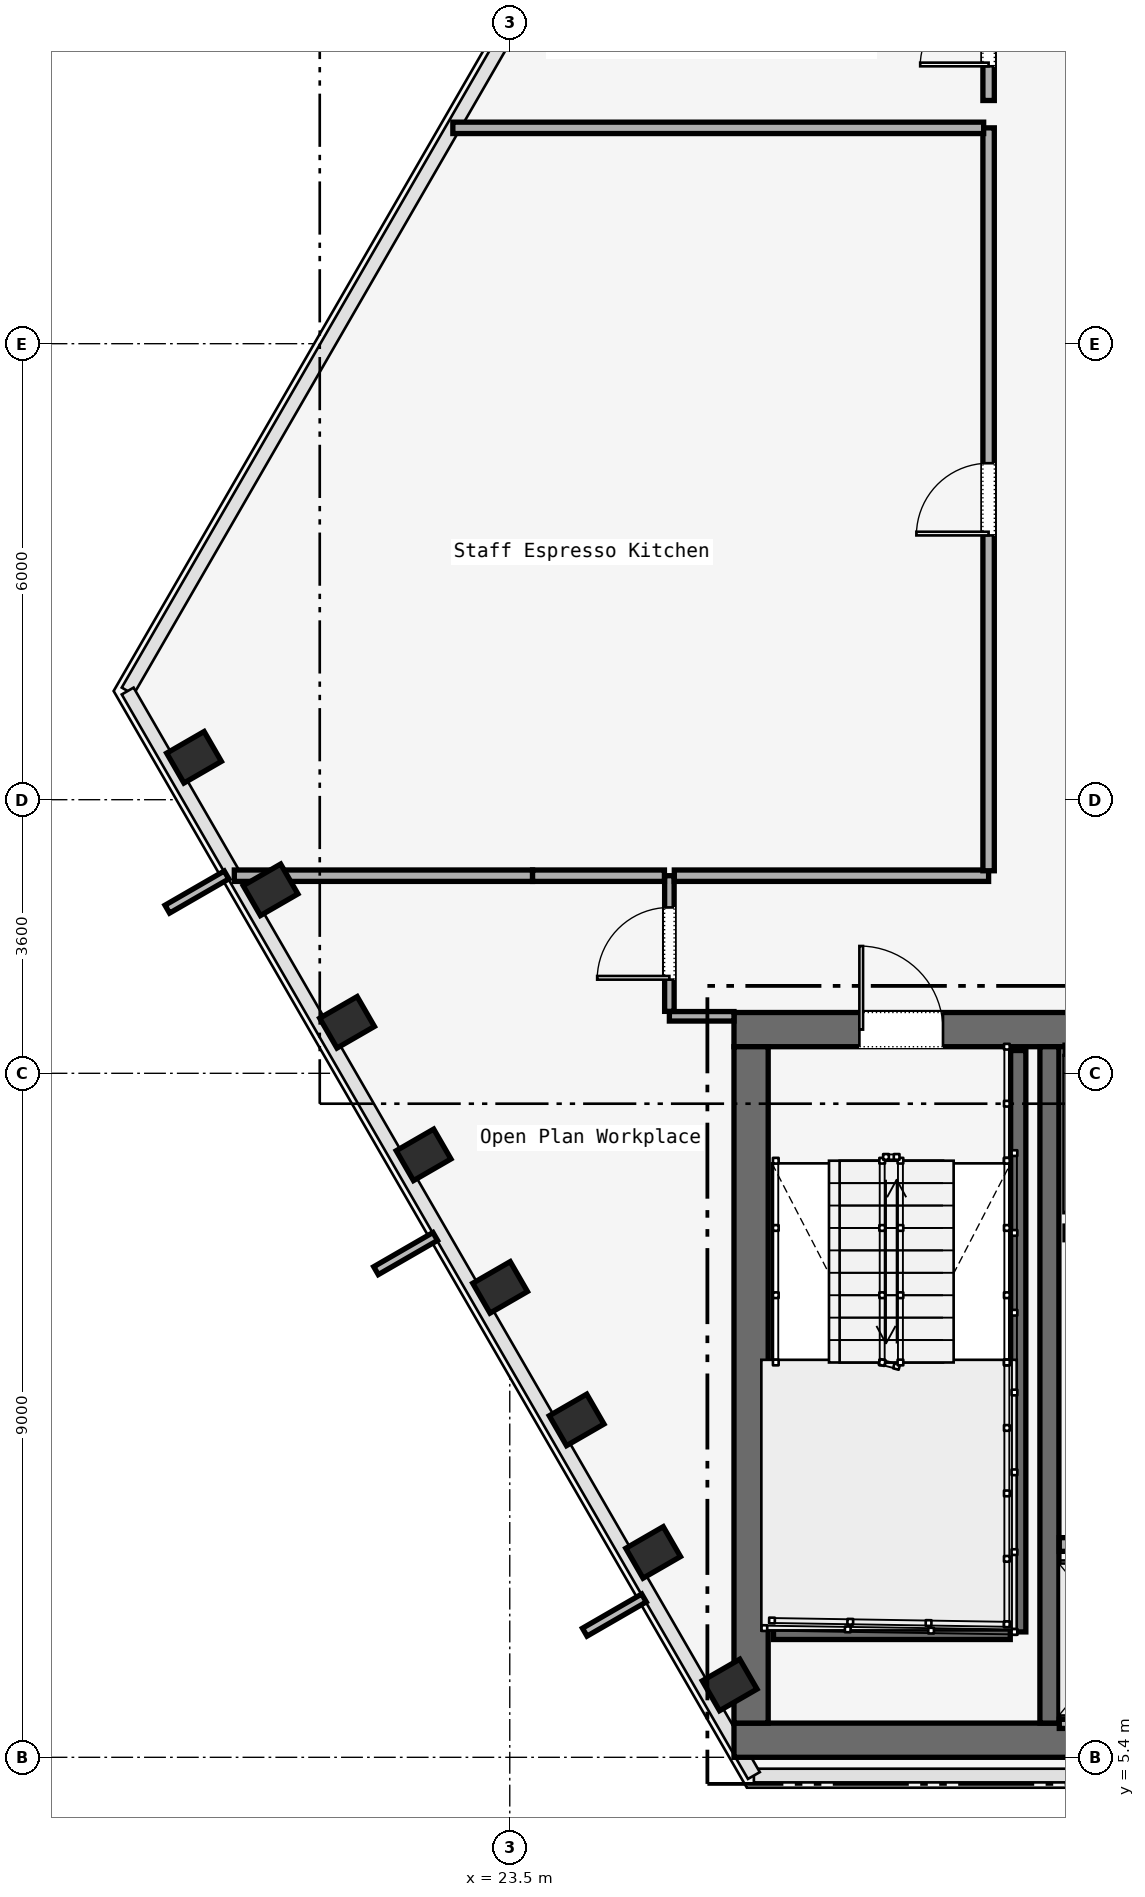
"""IFC4 building model, lengths in metres.
Left out: names, types, materials, properties, quantities, classifications, styles, units other than length and angle.
Written with IfcOpenShell. Run it as: python <this file> out.ifc"""

import sys

from ifc_helpers import new_model, si_unit, direction, frame, frame_2d, origin, origin_2d, place, context, subcontext, project, spatial, rectangle, i_section, extrude, element, fill, save


model = new_model("IFC4")
c1 = context("Model", 3, precision=1e-05, world=origin(), true_north=direction((0.0, 1.0)))
c2 = subcontext(c1, "Body", "Model", "MODEL_VIEW")
j1 = project(units=[si_unit("LENGTHUNIT", "METRE"), si_unit("PLANEANGLEUNIT", "RADIAN")], contexts=[c1])
p1 = place(None, origin())
s1 = spatial("IfcSite", under=j1, at=p1, CompositionType="ELEMENT")
p2 = place(p1, origin())
s2 = spatial("IfcBuilding", under=s1, at=p2, CompositionType="ELEMENT")
p3 = place(p2, frame((0.0, 0.0, 36.0)))
s3 = spatial("IfcBuildingStorey", under=s2, at=p3, CompositionType="ELEMENT", Elevation=36.0)
p4 = place(p3, frame((26.45, 14.975, 0.0), z_axis=(0.0, 0.0, 1.0), x_axis=(1.0, 0.0, 0.0)))
e1 = element("IfcWall", 1, at=p4, inside=s3, PredefinedType="SOLIDWALL", context=c2, shape_type="SweptSolid", body=[
    extrude(rectangle(XDim=31.1, YDim=0.45, at=frame_2d((15.55, 0.0))), origin(), (0.0, 0.0, 1.0), 3.58),
])
p5 = place(p4, frame((1.65, 0.0, 0.0)))
e2 = element("IfcOpeningElement", 2, at=p5, cuts=e1, PredefinedType="OPENING", context=c2, shape_type="SweptSolid", body=[
    extrude(rectangle(XDim=1.1, YDim=2.2, at=frame_2d((0.55, 1.1))), frame((0.0, 0.225, 0.0), z_axis=(0.0, -1.0, 0.0), x_axis=(1.0, 0.0, 0.0)), (0.0, 0.0, 1.0), 0.45),
])
p6 = place(p4, frame((13.65, 0.0, 0.0)))
e3 = element("IfcOpeningElement", 3, at=p6, cuts=e1, PredefinedType="OPENING", context=c2, shape_type="SweptSolid", body=[
    extrude(rectangle(XDim=1.1, YDim=2.2, at=frame_2d((0.55, 1.1))), frame((0.0, 0.225, 0.0), z_axis=(0.0, -1.0, 0.0), x_axis=(1.0, 0.0, 0.0)), (0.0, 0.0, 1.0), 0.45),
])
p7 = place(p4, frame((25.55, 0.0, 0.0)))
e4 = element("IfcOpeningElement", 4, at=p7, cuts=e1, PredefinedType="OPENING", context=c2, shape_type="SweptSolid", body=[
    extrude(rectangle(XDim=1.1, YDim=2.2, at=frame_2d((0.55, 1.1))), frame((0.0, 0.225, 0.0), z_axis=(0.0, -1.0, 0.0), x_axis=(1.0, 0.0, 0.0)), (0.0, 0.0, 1.0), 0.45),
])
p8 = place(p4, frame((10.7, 0.0, 0.0)))
e5 = element("IfcOpeningElement", 5, at=p8, cuts=e1, PredefinedType="OPENING", context=c2, shape_type="SweptSolid", body=[
    extrude(rectangle(XDim=1.4, YDim=2.2, at=frame_2d((0.7, 1.1))), frame((0.0, 0.225, 0.0), z_axis=(0.0, -1.0, 0.0), x_axis=(1.0, 0.0, 0.0)), (0.0, 0.0, 1.0), 0.45),
])
p9 = place(p4, frame((19.35, 0.0, 0.0)))
e6 = element("IfcOpeningElement", 6, at=p9, cuts=e1, PredefinedType="OPENING", context=c2, shape_type="SweptSolid", body=[
    extrude(rectangle(XDim=1.1, YDim=2.2, at=frame_2d((0.55, 1.1))), frame((0.0, 0.225, 0.0), z_axis=(0.0, -1.0, 0.0), x_axis=(1.0, 0.0, 0.0)), (0.0, 0.0, 1.0), 0.45),
])
p10 = place(p4, frame((21.4, 0.0, 0.0)))
e7 = element("IfcOpeningElement", 7, at=p10, cuts=e1, PredefinedType="OPENING", context=c2, shape_type="SweptSolid", body=[
    extrude(rectangle(XDim=0.9, YDim=2.1, at=frame_2d((0.45, 1.05))), frame((0.0, 0.225, 0.0), z_axis=(0.0, -1.0, 0.0), x_axis=(1.0, 0.0, 0.0)), (0.0, 0.0, 1.0), 0.45),
])
p11 = place(p4, frame((23.35, 0.0, 0.0)))
e8 = element("IfcOpeningElement", 8, at=p11, cuts=e1, PredefinedType="OPENING", context=c2, shape_type="SweptSolid", body=[
    extrude(rectangle(XDim=1.3, YDim=2.3, at=frame_2d((0.65, 1.15))), frame((0.0, 0.225, 0.0), z_axis=(0.0, -1.0, 0.0), x_axis=(1.0, 0.0, 0.0)), (0.0, 0.0, 1.0), 0.45),
])
p12 = place(p3, frame((26.45, 5.625, 0.0), z_axis=(0.0, 0.0, 1.0), x_axis=(1.0, 0.0, 0.0)))
e9 = element("IfcWall", 9, at=p12, inside=s3, PredefinedType="SOLIDWALL", context=c2, shape_type="SweptSolid", body=[
    extrude(rectangle(XDim=31.1, YDim=0.45, at=frame_2d((15.55, 0.0))), origin(), (0.0, 0.0, 1.0), 3.58),
])
p13 = place(p3, frame((26.675, 5.85, 0.0), z_axis=(0.0, 0.0, 1.0), x_axis=(0.0, 1.0, 0.0)))
e10 = element("IfcWall", 10, at=p13, inside=s3, PredefinedType="SOLIDWALL", context=c2, shape_type="SweptSolid", body=[
    extrude(rectangle(XDim=8.9, YDim=0.45, at=frame_2d((4.45, 0.0))), origin(), (0.0, 0.0, 1.0), 3.58),
])
p14 = place(p3, frame((30.6, 5.85, 0.0), z_axis=(0.0, 0.0, 1.0), x_axis=(0.0, 1.0, 0.0)))
e11 = element("IfcWall", 11, at=p14, inside=s3, PredefinedType="SOLIDWALL", context=c2, shape_type="SweptSolid", body=[
    extrude(rectangle(XDim=8.9, YDim=0.25, at=frame_2d((4.45, 0.0))), origin(), (0.0, 0.0, 1.0), 3.58),
])
for number, where, z_axis, x_axis in (
    (12, (19.346, 18.558, 0.0), (0.0, 0.0, 1.0), (-0.5, 0.866, 0.0)),
    (13, (20.353, 16.814, 0.0), (0.0, 0.0, 1.0), (-0.5, 0.866, 0.0)),
    (14, (21.359, 15.071, 0.0), (0.0, 0.0, 1.0), (-0.5, 0.866, 0.0)),
    (15, (22.366, 13.327, 0.0), (0.0, 0.0, 1.0), (-0.5, 0.866, 0.0)),
    (16, (23.373, 11.583, 0.0), (0.0, 0.0, 1.0), (-0.5, 0.866, 0.0)),
    (17, (24.38, 9.839, 0.0), (0.0, 0.0, 1.0), (-0.5, 0.866, 0.0)),
    (18, (25.386, 8.096, 0.0), (0.0, 0.0, 1.0), (-0.5, 0.866, 0.0)),
    (19, (26.393, 6.352, 0.0), (0.0, 0.0, 1.0), (-0.5, 0.866, 0.0)),
):
    element("IfcColumn", number, at=place(p3, frame(where, z_axis=z_axis, x_axis=x_axis)), inside=s3, PredefinedType="COLUMN", context=c2, shape_type="SweptSolid", body=[
        extrude(i_section(OverallWidth=0.454, OverallDepth=0.569, WebThickness=0.078, FlangeThickness=0.08, FilletRadius=0.015, at=origin_2d()), origin(), (0.0, 0.0, 1.0), 3.58),
    ])
p15 = place(p3, frame((30.19, 14.7, 0.0), z_axis=(0.0, 0.0, 1.0), x_axis=(0.0, -1.0, 0.0)))
e20 = element("IfcWall", 20, at=p15, inside=s3, PredefinedType="SOLIDWALL", context=c2, shape_type="SweptSolid", body=[
    extrude(rectangle(XDim=7.65, YDim=0.2, at=frame_2d((3.825, 0.0))), origin(), (0.0, 0.0, 1.0), 3.8),
])
p16 = place(p3, frame((26.97, 7.05, 0.0), z_axis=(0.0, 0.0, 1.0), x_axis=(1.0, 0.0, 0.0)))
e21 = element("IfcWall", 21, at=p16, inside=s3, PredefinedType="SOLIDWALL", context=c2, shape_type="SweptSolid", body=[
    extrude(rectangle(XDim=3.115, YDim=0.2, at=frame_2d((1.558, 0.0))), origin(), (0.0, 0.0, 1.0), 3.8),
])
p17 = place(p3, frame((30.73, 8.2, 0.0), z_axis=(0.0, 0.0, 1.0), x_axis=(1.0, 0.0, 0.0)))
e22 = element("IfcWall", 22, at=p17, inside=s3, PredefinedType="SOLIDWALL", context=c2, shape_type="SweptSolid", body=[
    extrude(rectangle(XDim=1.665, YDim=0.18, at=frame_2d((0.833, 0.0))), origin(), (0.0, 0.0, 1.0), 2.933),
])
p18 = place(p17, frame((0.282, 0.0, 0.0)))
e23 = element("IfcOpeningElement", 23, at=p18, cuts=e22, PredefinedType="OPENING", context=c2, shape_type="SweptSolid", body=[
    extrude(rectangle(XDim=1.1, YDim=2.2, at=frame_2d((0.55, 1.1))), frame((0.0, 0.09, 0.0), z_axis=(0.0, -1.0, 0.0), x_axis=(1.0, 0.0, 0.0)), (0.0, 0.0, 1.0), 0.18),
])
p19 = place(p3, frame((30.73, 5.84, 0.0), z_axis=(0.0, 0.0, 1.0), x_axis=(1.0, 0.0, 0.0)))
e24 = element("IfcWall", 24, at=p19, inside=s3, PredefinedType="SOLIDWALL", context=c2, shape_type="SweptSolid", body=[
    extrude(rectangle(XDim=1.665, YDim=0.12, at=frame_2d((0.833, 0.0))), origin(), (0.0, 0.0, 1.0), 2.933),
])
p20 = place(p3, frame((26.45, 15.15, 0.0), z_axis=(0.0, 0.0, 1.0), x_axis=(-1.0, 0.0, 0.0)))
e25 = element("IfcWall", 25, at=p20, inside=s3, PredefinedType="PARTITIONING", context=c2, shape_type="SweptSolid", body=[
    extrude(rectangle(XDim=0.85, YDim=0.125, at=frame_2d((0.425, 0.0))), origin(), (0.0, 0.0, 1.0), 2.933),
])
p21 = place(p3, frame((25.6, 15.215, 0.0), z_axis=(0.0, 0.0, 1.0), x_axis=(0.0, 1.0, 0.0)))
e26 = element("IfcWall", 26, at=p21, inside=s3, PredefinedType="PARTITIONING", context=c2, shape_type="SweptSolid", body=[
    extrude(rectangle(XDim=1.785, YDim=0.125, at=frame_2d((0.893, 0.0))), origin(), (0.0, 0.0, 1.0), 2.933),
])
p22 = place(p21, frame((0.417, 0.0, 0.0)))
e27 = element("IfcOpeningElement", 27, at=p22, cuts=e26, PredefinedType="OPENING", context=c2, shape_type="SweptSolid", body=[
    extrude(rectangle(XDim=0.95, YDim=2.2, at=frame_2d((0.475, 1.1))), frame((0.0, 0.062, 0.0), z_axis=(0.0, -1.0, 0.0), x_axis=(1.0, 0.0, 0.0)), (0.0, 0.0, 1.0), 0.125),
])
p23 = place(p3, frame((25.665, 17.0, 0.0), z_axis=(0.0, 0.0, 1.0), x_axis=(1.0, 0.0, 0.0)))
e28 = element("IfcWall", 28, at=p23, inside=s3, PredefinedType="PARTITIONING", context=c2, shape_type="SweptSolid", body=[
    extrude(rectangle(XDim=4.135, YDim=0.15, at=frame_2d((2.067, 0.0))), origin(), (0.0, 0.0, 1.0), 2.933),
])
p24 = place(p3, frame((29.8, 17.065, 0.0), z_axis=(0.0, 0.0, 1.0), x_axis=(0.0, 1.0, 0.0)))
e29 = element("IfcWall", 29, at=p24, inside=s3, PredefinedType="PARTITIONING", context=c2, shape_type="SweptSolid", body=[
    extrude(rectangle(XDim=9.775, YDim=0.15, at=frame_2d((4.888, 0.0))), origin(), (0.0, 0.0, 1.0), 2.933),
])
p25 = place(p24, frame((4.413, 0.0, 0.0)))
e30 = element("IfcOpeningElement", 30, at=p25, cuts=e29, PredefinedType="OPENING", context=c2, shape_type="SweptSolid", body=[
    extrude(rectangle(XDim=0.95, YDim=2.2, at=frame_2d((0.475, 1.1))), frame((0.0, 0.075, 0.0), z_axis=(0.0, -1.0, 0.0), x_axis=(1.0, 0.0, 0.0)), (0.0, 0.0, 1.0), 0.15),
])
p26 = place(p3, frame((29.8, 27.2, 0.0), z_axis=(0.0, 0.0, 1.0), x_axis=(0.0, 1.0, 0.0)))
e31 = element("IfcWall", 31, at=p26, inside=s3, PredefinedType="PARTITIONING", context=c2, shape_type="SweptSolid", body=[
    extrude(rectangle(XDim=1.8, YDim=0.15, at=frame_2d((0.9, 0.0))), origin(), (0.0, 0.0, 1.0), 2.933),
])
p27 = place(p26, frame((0.45, 0.0, 0.0)))
e32 = element("IfcOpeningElement", 32, at=p27, cuts=e31, PredefinedType="OPENING", context=c2, shape_type="SweptSolid", body=[
    extrude(rectangle(XDim=0.9, YDim=2.15, at=frame_2d((0.45, 1.075))), frame((0.0, 0.075, 0.0), z_axis=(0.0, -1.0, 0.0), x_axis=(1.0, 0.0, 0.0)), (0.0, 0.0, 1.0), 0.15),
])
p28 = place(p3, frame((19.876, 17.0, 0.0), z_axis=(0.0, 0.0, 1.0), x_axis=(1.0, 0.0, 0.0)))
e33 = element("IfcWall", 33, at=p28, inside=s3, PredefinedType="PARTITIONING", context=c2, shape_type="SweptSolid", body=[
    extrude(rectangle(XDim=3.924, YDim=0.15, at=frame_2d((1.962, 0.0))), origin(), (0.0, 0.0, 1.0), 2.933),
])
p29 = place(p3, frame((23.8, 17.0, 0.0), z_axis=(0.0, 0.0, 1.0), x_axis=(1.0, 0.0, 0.0)))
e34 = element("IfcWall", 34, at=p29, inside=s3, PredefinedType="PARTITIONING", context=c2, shape_type="SweptSolid", body=[
    extrude(rectangle(XDim=1.735, YDim=0.15, at=frame_2d((0.867, 0.0))), origin(), (0.0, 0.0, 1.0), 2.933),
])
p30 = place(p3, frame((22.751, 26.84, 0.0), z_axis=(0.0, 0.0, 1.0), x_axis=(1.0, 0.0, 0.0)))
e35 = element("IfcWall", 35, at=p30, inside=s3, PredefinedType="PARTITIONING", context=c2, shape_type="SweptSolid", body=[
    extrude(rectangle(XDim=6.984, YDim=0.15, at=frame_2d((3.492, 0.0))), origin(), (0.0, 0.0, 1.0), 2.933),
])
p31 = place(p5, origin())
e36 = element("IfcDoor", 36, at=p31, inside=s3, OperationType="SINGLE_SWING_LEFT", PredefinedType="DOOR", context=c2, shape_type="SweptSolid", body=[
    extrude(rectangle(XDim=1.1, YDim=2.2, at=frame_2d((0.55, 1.1))), frame((0.0, 0.025, 0.0), z_axis=(0.0, -1.0, 0.0), x_axis=(1.0, 0.0, 0.0)), (0.0, 0.0, 1.0), 0.05),
])
fill(e2, e36)
p32 = place(p22, origin())
e37 = element("IfcDoor", 37, at=p32, inside=s3, OperationType="SINGLE_SWING_LEFT", PredefinedType="DOOR", context=c2, shape_type="SweptSolid", body=[
    extrude(rectangle(XDim=0.95, YDim=2.2, at=frame_2d((0.475, 1.1))), frame((0.0, 0.025, 0.0), z_axis=(0.0, -1.0, 0.0), x_axis=(1.0, 0.0, 0.0)), (0.0, 0.0, 1.0), 0.05),
])
fill(e27, e37)
p33 = place(p25, origin())
e38 = element("IfcDoor", 38, at=p33, inside=s3, OperationType="SINGLE_SWING_LEFT", PredefinedType="DOOR", context=c2, shape_type="SweptSolid", body=[
    extrude(rectangle(XDim=0.95, YDim=2.2, at=frame_2d((0.475, 1.1))), frame((0.0, 0.025, 0.0), z_axis=(0.0, -1.0, 0.0), x_axis=(1.0, 0.0, 0.0)), (0.0, 0.0, 1.0), 0.05),
])
fill(e30, e38)
p34 = place(p27, origin())
e39 = element("IfcDoor", 39, at=p34, inside=s3, OperationType="SINGLE_SWING_RIGHT", PredefinedType="DOOR", context=c2, shape_type="SweptSolid", body=[
    extrude(rectangle(XDim=0.9, YDim=2.15, at=frame_2d((0.45, 1.075))), frame((0.0, 0.025, 0.0), z_axis=(0.0, -1.0, 0.0), x_axis=(1.0, 0.0, 0.0)), (0.0, 0.0, 1.0), 0.05),
])
fill(e32, e39)
save(model, sys.argv[1])
